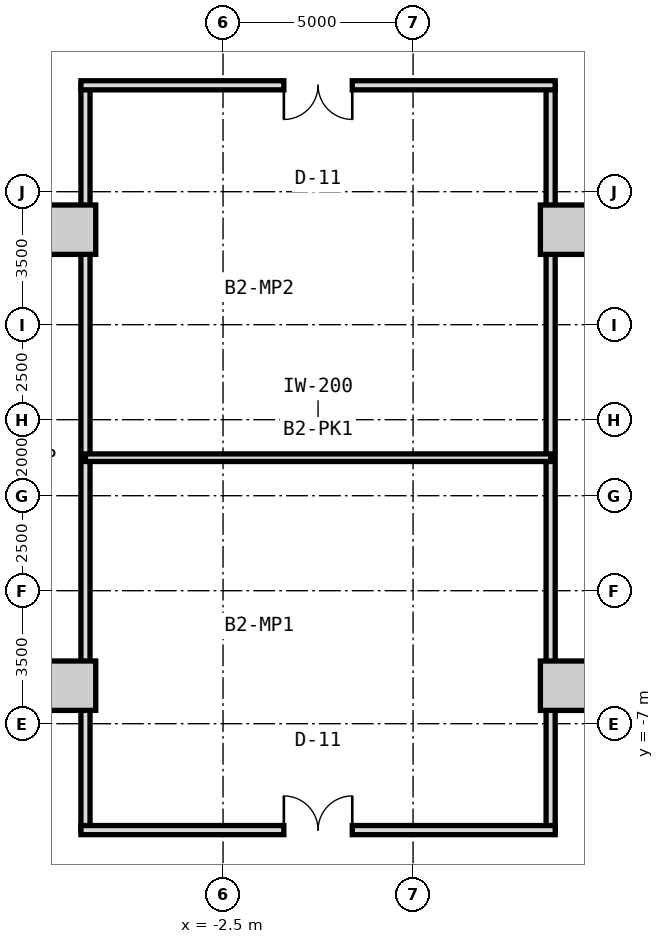
"""IFC4 building model, lengths in metres.
Left out: names, types, materials, properties, quantities, classifications, styles, units other than length and angle.
Written with IfcOpenShell. Run it as: python <this file> out.ifc"""

import sys

from ifc_helpers import new_model, si_unit, direction, frame, frame_2d, origin, origin_2d, place, context, subcontext, project, spatial, rectangle, extrude, source, transform, mapped, element, fill, save


model = new_model("IFC4")
c1 = context("Model", 3, precision=1e-05, world=origin(), true_north=direction((0.0, 1.0)))
c2 = subcontext(c1, "Body", "Model", "MODEL_VIEW")
j1 = project(units=[si_unit("LENGTHUNIT", "METRE"), si_unit("PLANEANGLEUNIT", "RADIAN")], contexts=[c1])
p1 = place(None, origin())
s1 = spatial("IfcSite", under=j1, at=p1, CompositionType="ELEMENT")
p2 = place(p1, origin())
s2 = spatial("IfcBuilding", under=s1, at=p2, CompositionType="ELEMENT")
p3 = place(p2, frame((0.0, 0.0, -8.4)))
s3 = spatial("IfcBuildingStorey", under=s2, at=p3, CompositionType="ELEMENT", Elevation=-8.4)
m1 = source(origin(), c2, "Body", "SweptSolid", [
    extrude(rectangle(XDim=1.3, YDim=1.3, at=origin_2d()), origin(), (0.0, 0.0, 1.0), 4.2),
])
for number, where, z_axis, x_axis in (
    (1, (-6.5, -6.0, 0.0), (0.0, 0.0, 1.0), (1.0, 0.0, 0.0)),
    (2, (-6.5, 6.0, 0.0), (0.0, 0.0, 1.0), (1.0, 0.0, 0.0)),
    (3, (6.5, -6.0, 0.0), (0.0, 0.0, 1.0), (1.0, 0.0, 0.0)),
    (4, (6.5, 6.0, 0.0), (0.0, 0.0, 1.0), (1.0, 0.0, 0.0)),
):
    element("IfcColumn", number, at=place(p3, frame(where, z_axis=z_axis, x_axis=x_axis)), inside=s3, PredefinedType="COLUMN", context=c2, shape_type="MappedRepresentation", body=[
        mapped(m1, transform((0.0, 0.0, 0.0), x_axis=(1.0, 0.0, 0.0), y_axis=(0.0, 1.0, 0.0), z_axis=(0.0, 0.0, 1.0), scale=1.0)),
    ])
m2 = source(origin(), c2, "Body", "SweptSolid", [
    extrude(rectangle(XDim=19.6, YDim=0.24, at=frame_2d((9.8, 0.0))), origin(), (0.0, 0.0, 1.0), 3.115),
])
for number, where, z_axis, x_axis in (
    (5, (-6.12, -9.8, 0.0), (0.0, 0.0, 1.0), (0.0, 1.0, 0.0)),
    (6, (6.12, -9.8, 0.0), (0.0, 0.0, 1.0), (0.0, 1.0, 0.0)),
):
    element("IfcWall", number, at=place(p3, frame(where, z_axis=z_axis, x_axis=x_axis)), inside=s3, PredefinedType="PARTITIONING", context=c2, shape_type="MappedRepresentation", body=[
        mapped(m2, transform((0.0, 0.0, 0.0), x_axis=(1.0, 0.0, 0.0), y_axis=(0.0, 1.0, 0.0), z_axis=(0.0, 0.0, 1.0), scale=1.0)),
    ])
m3 = source(origin(), c2, "Body", "SweptSolid", [
    extrude(rectangle(XDim=12.48, YDim=0.24, at=frame_2d((6.24, 0.0))), origin(), (0.0, 0.0, 1.0), 3.865),
])
p4 = place(p3, frame((-6.24, -9.8, 0.0), z_axis=(0.0, 0.0, 1.0), x_axis=(1.0, 0.0, 0.0)))
e7 = element("IfcWall", 7, at=p4, inside=s3, PredefinedType="PARTITIONING", context=c2, shape_type="MappedRepresentation", body=[
    mapped(m3, transform((0.0, 0.0, 0.0), x_axis=(1.0, 0.0, 0.0), y_axis=(0.0, 1.0, 0.0), z_axis=(0.0, 0.0, 1.0), scale=1.0)),
])
p5 = place(p4, frame((5.34, 0.0, 0.0)))
e8 = element("IfcOpeningElement", 8, at=p5, cuts=e7, PredefinedType="OPENING", context=c2, shape_type="SweptSolid", body=[
    extrude(rectangle(XDim=1.8, YDim=2.4, at=frame_2d((0.9, 1.2))), frame((0.0, 0.13, 0.0), z_axis=(0.0, -1.0, 0.0), x_axis=(1.0, 0.0, 0.0)), (0.0, 0.0, 1.0), 0.26),
])
p6 = place(p3, frame((-6.24, 9.8, 0.0), z_axis=(0.0, 0.0, 1.0), x_axis=(1.0, 0.0, 0.0)))
e9 = element("IfcWall", 9, at=p6, inside=s3, PredefinedType="PARTITIONING", context=c2, shape_type="MappedRepresentation", body=[
    mapped(m3, transform((0.0, 0.0, 0.0), x_axis=(1.0, 0.0, 0.0), y_axis=(0.0, 1.0, 0.0), z_axis=(0.0, 0.0, 1.0), scale=1.0)),
])
p7 = place(p6, frame((5.34, 0.0, 0.0)))
e10 = element("IfcOpeningElement", 10, at=p7, cuts=e9, PredefinedType="OPENING", context=c2, shape_type="SweptSolid", body=[
    extrude(rectangle(XDim=1.8, YDim=2.4, at=frame_2d((0.9, 1.2))), frame((0.0, 0.13, 0.0), z_axis=(0.0, -1.0, 0.0), x_axis=(1.0, 0.0, 0.0)), (0.0, 0.0, 1.0), 0.26),
])
m4 = source(origin(), c2, "Body", "SweptSolid", [
    extrude(rectangle(XDim=12.24, YDim=0.2, at=frame_2d((6.12, 0.0))), origin(), (0.0, 0.0, 1.0), 3.865),
])
p8 = place(p3, frame((-6.12, 0.0, 0.0), z_axis=(0.0, 0.0, 1.0), x_axis=(1.0, 0.0, 0.0)))
e11 = element("IfcWall", 11, at=p8, inside=s3, PredefinedType="PARTITIONING", context=c2, shape_type="MappedRepresentation", body=[
    mapped(m4, transform((0.0, 0.0, 0.0), x_axis=(1.0, 0.0, 0.0), y_axis=(0.0, 1.0, 0.0), z_axis=(0.0, 0.0, 1.0), scale=1.0)),
])
m5 = source(origin(), c2, "Body", "SweptSolid", [
    extrude(rectangle(XDim=1.8, YDim=2.4, at=frame_2d((0.9, 1.2))), frame((0.0, 0.025, 0.0), z_axis=(0.0, -1.0, 0.0), x_axis=(1.0, 0.0, 0.0)), (0.0, 0.0, 1.0), 0.05),
])
p9 = place(p5, origin())
e12 = element("IfcDoor", 12, at=p9, inside=s3, OperationType="DOUBLE_DOOR_SINGLE_SWING", PredefinedType="DOOR", context=c2, shape_type="MappedRepresentation", body=[
    mapped(m5, transform((0.0, 0.0, 0.0), x_axis=(1.0, 0.0, 0.0), y_axis=(0.0, 1.0, 0.0), z_axis=(0.0, 0.0, 1.0), scale=1.0)),
])
fill(e8, e12)
p10 = place(p7, frame((1.8, 0.0, 0.0), z_axis=(0.0, 0.0, 1.0), x_axis=(-1.0, 0.0, 0.0)))
e13 = element("IfcDoor", 13, at=p10, inside=s3, OperationType="DOUBLE_DOOR_SINGLE_SWING", PredefinedType="DOOR", context=c2, shape_type="MappedRepresentation", body=[
    mapped(m5, transform((0.0, 0.0, 0.0), x_axis=(1.0, 0.0, 0.0), y_axis=(0.0, 1.0, 0.0), z_axis=(0.0, 0.0, 1.0), scale=1.0)),
])
fill(e10, e13)
save(model, sys.argv[1])
